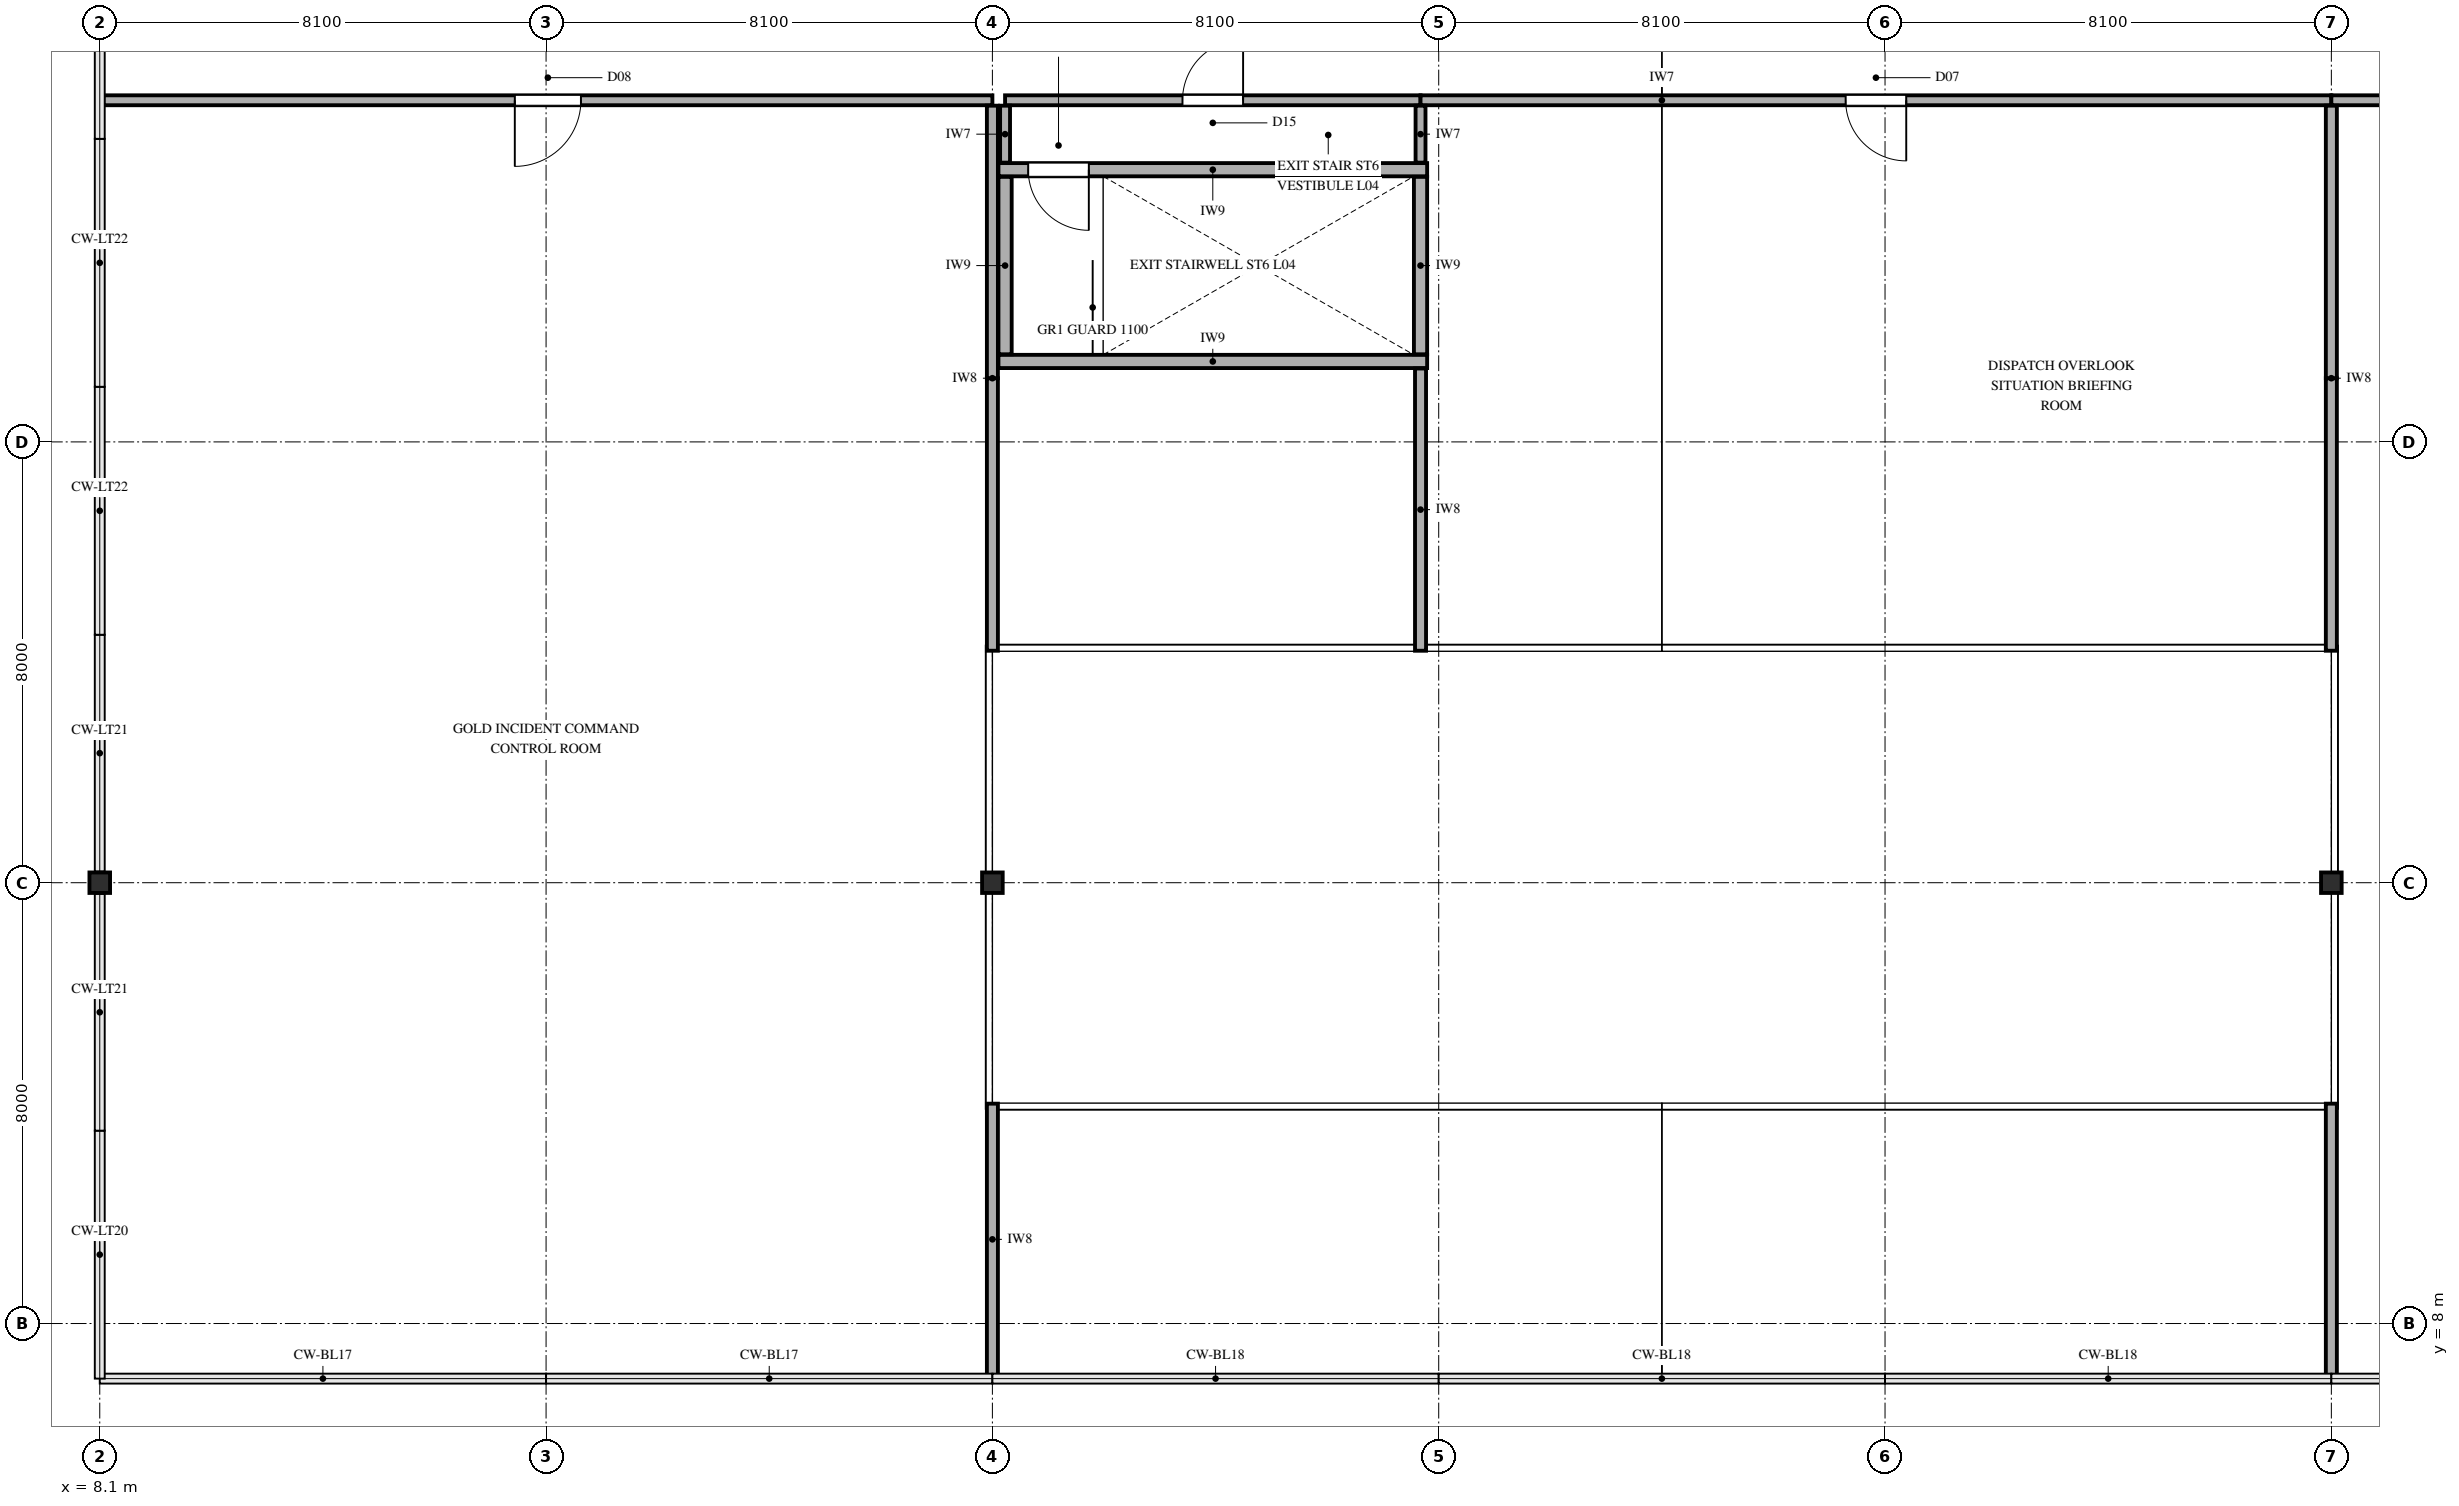
"""IFC4 building model, lengths in metres.
Left out: names, types, materials, properties, quantities, classifications, styles, units other than length and angle.
Written with IfcOpenShell. Run it as: python <this file> out.ifc"""

import sys

from ifc_helpers import new_model, si_unit, direction, frame, frame_2d, origin, origin_2d, place, context, subcontext, project, spatial, rectangle, i_section, extrude, element, fill, save


model = new_model("IFC4")
c1 = context("Model", 3, precision=1e-05, world=origin(), true_north=direction((0.0, 1.0)))
c2 = subcontext(c1, "Body", "Model", "MODEL_VIEW")
j1 = project(units=[si_unit("LENGTHUNIT", "METRE"), si_unit("PLANEANGLEUNIT", "RADIAN")], contexts=[c1])
p1 = place(None, origin())
s1 = spatial("IfcSite", under=j1, at=p1, CompositionType="ELEMENT")
p2 = place(p1, origin())
s2 = spatial("IfcBuilding", under=s1, at=p2, CompositionType="ELEMENT")
p3 = place(p2, frame((0.0, 0.0, 19.8)))
s3 = spatial("IfcBuildingStorey", under=s2, at=p3, CompositionType="ELEMENT", Elevation=19.8)
for number, where, z_axis, x_axis in (
    (1, (8.1, 16.0, 0.0), (0.0, 0.0, 1.0), (1.0, 0.0, 0.0)),
    (2, (24.3, 16.0, 0.0), (0.0, 0.0, 1.0), (1.0, 0.0, 0.0)),
    (3, (48.6, 16.0, 0.0), (0.0, 0.0, 1.0), (1.0, 0.0, 0.0)),
):
    element("IfcColumn", number, at=place(p3, frame(where, z_axis=z_axis, x_axis=x_axis)), inside=s3, PredefinedType="COLUMN", context=c2, shape_type="SweptSolid", body=[
        extrude(i_section(OverallWidth=0.374, OverallDepth=0.372, WebThickness=0.016, FlangeThickness=0.026, FilletRadius=0.016, at=origin_2d()), origin(), (0.0, 0.0, 1.0), 4.86),
    ])
p4 = place(p3, frame((24.41, 25.46, 0.0), z_axis=(0.0, 0.0, 1.0), x_axis=(1.0, 0.0, 0.0)))
e4 = element("IfcWall", 4, at=p4, inside=s3, PredefinedType="PARTITIONING", context=c2, shape_type="SweptSolid", body=[
    extrude(rectangle(XDim=7.78, YDim=0.24, at=frame_2d((3.89, 0.0))), origin(), (0.0, 0.0, 1.0), 4.86),
])
p5 = place(p3, frame((24.41, 28.94, 0.0), z_axis=(0.0, 0.0, 1.0), x_axis=(1.0, 0.0, 0.0)))
e5 = element("IfcWall", 5, at=p5, inside=s3, PredefinedType="PARTITIONING", context=c2, shape_type="SweptSolid", body=[
    extrude(rectangle(XDim=7.78, YDim=0.24, at=frame_2d((3.89, 0.0))), origin(), (0.0, 0.0, 1.0), 4.86),
])
p6 = place(p5, frame((0.54, 0.0, 0.0)))
e6 = element("IfcOpeningElement", 6, at=p6, cuts=e5, PredefinedType="OPENING", context=c2, shape_type="SweptSolid", body=[
    extrude(rectangle(XDim=1.1, YDim=2.2, at=frame_2d((0.55, 1.1))), frame((0.0, 0.13, 0.0), z_axis=(0.0, -1.0, 0.0), x_axis=(1.0, 0.0, 0.0)), (0.0, 0.0, 1.0), 0.26),
])
p7 = place(p3, frame((24.53, 25.59, 0.0), z_axis=(0.0, 0.0, 1.0), x_axis=(0.0, 1.0, 0.0)))
e7 = element("IfcWall", 7, at=p7, inside=s3, PredefinedType="PARTITIONING", context=c2, shape_type="SweptSolid", body=[
    extrude(rectangle(XDim=3.22, YDim=0.24, at=frame_2d((1.61, 0.0))), origin(), (0.0, 0.0, 1.0), 4.173),
])
p8 = place(p3, frame((32.07, 25.59, 0.0), z_axis=(0.0, 0.0, 1.0), x_axis=(0.0, 1.0, 0.0)))
e8 = element("IfcWall", 8, at=p8, inside=s3, PredefinedType="PARTITIONING", context=c2, shape_type="SweptSolid", body=[
    extrude(rectangle(XDim=3.22, YDim=0.24, at=frame_2d((1.61, 0.0))), origin(), (0.0, 0.0, 1.0), 4.617),
])
p9 = place(p3, frame((8.165, 30.2, 0.0), z_axis=(0.0, 0.0, 1.0), x_axis=(1.0, 0.0, 0.0)))
e9 = element("IfcWall", 9, at=p9, inside=s3, PredefinedType="PARTITIONING", context=c2, shape_type="SweptSolid", body=[
    extrude(rectangle(XDim=16.135, YDim=0.18, at=frame_2d((8.067, 0.0))), origin(), (0.0, 0.0, 1.0), 4.86),
])
p10 = place(p9, frame((7.468, 0.0, 0.0)))
e10 = element("IfcOpeningElement", 10, at=p10, cuts=e9, PredefinedType="OPENING", context=c2, shape_type="SweptSolid", body=[
    extrude(rectangle(XDim=1.2, YDim=2.25, at=frame_2d((0.6, 1.125))), frame((0.0, 0.1, 0.0), z_axis=(0.0, -1.0, 0.0), x_axis=(1.0, 0.0, 0.0)), (0.0, 0.0, 1.0), 0.2),
])
p11 = place(p3, frame((24.53, 30.2, 0.0), z_axis=(0.0, 0.0, 1.0), x_axis=(1.0, 0.0, 0.0)))
e11 = element("IfcWall", 11, at=p11, inside=s3, PredefinedType="PARTITIONING", context=c2, shape_type="SweptSolid", body=[
    extrude(rectangle(XDim=7.54, YDim=0.18, at=frame_2d((3.77, 0.0))), origin(), (0.0, 0.0, 1.0), 4.86),
])
p12 = place(p11, frame((3.22, 0.0, 0.0)))
e12 = element("IfcOpeningElement", 12, at=p12, cuts=e11, PredefinedType="OPENING", context=c2, shape_type="SweptSolid", body=[
    extrude(rectangle(XDim=1.1, YDim=2.2, at=frame_2d((0.55, 1.1))), frame((0.0, 0.1, 0.0), z_axis=(0.0, -1.0, 0.0), x_axis=(1.0, 0.0, 0.0)), (0.0, 0.0, 1.0), 0.2),
])
p13 = place(p3, frame((32.07, 30.2, 0.0), z_axis=(0.0, 0.0, 1.0), x_axis=(1.0, 0.0, 0.0)))
e13 = element("IfcWall", 13, at=p13, inside=s3, PredefinedType="PARTITIONING", context=c2, shape_type="SweptSolid", body=[
    extrude(rectangle(XDim=16.53, YDim=0.18, at=frame_2d((8.265, 0.0))), origin(), (0.0, 0.0, 1.0), 4.86),
])
p14 = place(p13, frame((7.715, 0.0, 0.0)))
e14 = element("IfcOpeningElement", 14, at=p14, cuts=e13, PredefinedType="OPENING", context=c2, shape_type="SweptSolid", body=[
    extrude(rectangle(XDim=1.1, YDim=2.2, at=frame_2d((0.55, 1.1))), frame((0.0, 0.1, 0.0), z_axis=(0.0, -1.0, 0.0), x_axis=(1.0, 0.0, 0.0)), (0.0, 0.0, 1.0), 0.2),
])
p15 = place(p3, frame((48.6, 30.2, 0.0), z_axis=(0.0, 0.0, 1.0), x_axis=(1.0, 0.0, 0.0)))
e15 = element("IfcWall", 15, at=p15, inside=s3, PredefinedType="PARTITIONING", context=c2, shape_type="SweptSolid", body=[
    extrude(rectangle(XDim=16.135, YDim=0.18, at=frame_2d((8.067, 0.0))), origin(), (0.0, 0.0, 1.0), 4.86),
])
p16 = place(p15, frame((7.468, 0.0, 0.0)))
e16 = element("IfcOpeningElement", 16, at=p16, cuts=e15, PredefinedType="OPENING", context=c2, shape_type="SweptSolid", body=[
    extrude(rectangle(XDim=1.2, YDim=2.25, at=frame_2d((0.6, 1.125))), frame((0.0, 0.1, 0.0), z_axis=(0.0, -1.0, 0.0), x_axis=(1.0, 0.0, 0.0)), (0.0, 0.0, 1.0), 0.2),
])
p17 = place(p3, frame((24.3, 7.065, 0.0), z_axis=(0.0, 0.0, 1.0), x_axis=(0.0, 1.0, 0.0)))
e17 = element("IfcWall", 17, at=p17, inside=s3, PredefinedType="PARTITIONING", context=c2, shape_type="SweptSolid", body=[
    extrude(rectangle(XDim=4.925, YDim=0.2, at=frame_2d((2.462, 0.0))), origin(), (0.0, 0.0, 1.0), 3.952),
])
for number, where, z_axis, x_axis in (
    (18, (24.3, 20.21, 0.0), (0.0, 0.0, 1.0), (0.0, 1.0, 0.0)),
    (19, (24.3, 25.156, 0.0), (0.0, 0.0, 1.0), (0.0, 1.0, 0.0)),
):
    element("IfcWall", number, at=place(p3, frame(where, z_axis=z_axis, x_axis=x_axis)), inside=s3, PredefinedType="PARTITIONING", context=c2, shape_type="SweptSolid", body=[
        extrude(rectangle(XDim=4.946, YDim=0.2, at=frame_2d((2.473, 0.0))), origin(), (0.0, 0.0, 1.0), 4.173),
    ])
p18 = place(p3, frame((24.53, 29.068, 0.0), z_axis=(0.0, 0.0, 1.0), x_axis=(0.0, 1.0, 0.0)))
e20 = element("IfcWall", 20, at=p18, inside=s3, PredefinedType="PARTITIONING", context=c2, shape_type="SweptSolid", body=[
    extrude(rectangle(XDim=1.034, YDim=0.18, at=frame_2d((0.517, 0.0))), origin(), (0.0, 0.0, 1.0), 4.173),
])
p19 = place(p3, frame((32.07, 20.21, 0.0), z_axis=(0.0, 0.0, 1.0), x_axis=(0.0, 1.0, 0.0)))
e21 = element("IfcWall", 21, at=p19, inside=s3, PredefinedType="PARTITIONING", context=c2, shape_type="SweptSolid", body=[
    extrude(rectangle(XDim=5.122, YDim=0.2, at=frame_2d((2.561, 0.0))), origin(), (0.0, 0.0, 1.0), 4.617),
])
p20 = place(p3, frame((32.07, 29.068, 0.0), z_axis=(0.0, 0.0, 1.0), x_axis=(0.0, 1.0, 0.0)))
e22 = element("IfcWall", 22, at=p20, inside=s3, PredefinedType="PARTITIONING", context=c2, shape_type="SweptSolid", body=[
    extrude(rectangle(XDim=1.034, YDim=0.18, at=frame_2d((0.517, 0.0))), origin(), (0.0, 0.0, 1.0), 4.617),
])
p21 = place(p3, frame((48.6, 7.065, 0.0), z_axis=(0.0, 0.0, 1.0), x_axis=(0.0, 1.0, 0.0)))
e23 = element("IfcWall", 23, at=p21, inside=s3, PredefinedType="PARTITIONING", context=c2, shape_type="SweptSolid", body=[
    extrude(rectangle(XDim=4.925, YDim=0.2, at=frame_2d((2.462, 0.0))), origin(), (0.0, 0.0, 1.0), 3.952),
])
for number, where, z_axis, x_axis in (
    (24, (48.6, 20.21, 0.0), (0.0, 0.0, 1.0), (0.0, 1.0, 0.0)),
    (25, (48.6, 25.156, 0.0), (0.0, 0.0, 1.0), (0.0, 1.0, 0.0)),
):
    element("IfcWall", number, at=place(p3, frame(where, z_axis=z_axis, x_axis=x_axis)), inside=s3, PredefinedType="PARTITIONING", context=c2, shape_type="SweptSolid", body=[
        extrude(rectangle(XDim=4.946, YDim=0.2, at=frame_2d((2.473, 0.0))), origin(), (0.0, 0.0, 1.0), 4.173),
    ])
p22 = place(p6, frame((1.1, 0.0, 0.0), z_axis=(0.0, 0.0, 1.0), x_axis=(-1.0, 0.0, 0.0)))
e26 = element("IfcDoor", 26, at=p22, inside=s3, OperationType="SINGLE_SWING_RIGHT", PredefinedType="DOOR", context=c2, shape_type="SweptSolid", body=[
    extrude(rectangle(XDim=1.1, YDim=2.2, at=frame_2d((0.55, 1.1))), frame((0.0, 0.025, 0.0), z_axis=(0.0, -1.0, 0.0), x_axis=(1.0, 0.0, 0.0)), (0.0, 0.0, 1.0), 0.05),
])
fill(e6, e26)
p23 = place(p10, frame((1.2, 0.0, 0.0), z_axis=(0.0, 0.0, 1.0), x_axis=(-1.0, 0.0, 0.0)))
e27 = element("IfcDoor", 27, at=p23, inside=s3, OperationType="SINGLE_SWING_LEFT", PredefinedType="DOOR", context=c2, shape_type="SweptSolid", body=[
    extrude(rectangle(XDim=1.2, YDim=2.25, at=frame_2d((0.6, 1.125))), frame((0.0, 0.025, 0.0), z_axis=(0.0, -1.0, 0.0), x_axis=(1.0, 0.0, 0.0)), (0.0, 0.0, 1.0), 0.05),
])
fill(e10, e27)
p24 = place(p12, origin())
e28 = element("IfcDoor", 28, at=p24, inside=s3, OperationType="SINGLE_SWING_RIGHT", PredefinedType="DOOR", context=c2, shape_type="SweptSolid", body=[
    extrude(rectangle(XDim=1.1, YDim=2.2, at=frame_2d((0.55, 1.1))), frame((0.0, 0.025, 0.0), z_axis=(0.0, -1.0, 0.0), x_axis=(1.0, 0.0, 0.0)), (0.0, 0.0, 1.0), 0.05),
])
fill(e12, e28)
p25 = place(p14, frame((1.1, 0.0, 0.0), z_axis=(0.0, 0.0, 1.0), x_axis=(-1.0, 0.0, 0.0)))
e29 = element("IfcDoor", 29, at=p25, inside=s3, OperationType="SINGLE_SWING_RIGHT", PredefinedType="DOOR", context=c2, shape_type="SweptSolid", body=[
    extrude(rectangle(XDim=1.1, YDim=2.2, at=frame_2d((0.55, 1.1))), frame((0.0, 0.025, 0.0), z_axis=(0.0, -1.0, 0.0), x_axis=(1.0, 0.0, 0.0)), (0.0, 0.0, 1.0), 0.05),
])
fill(e14, e29)
save(model, sys.argv[1])
